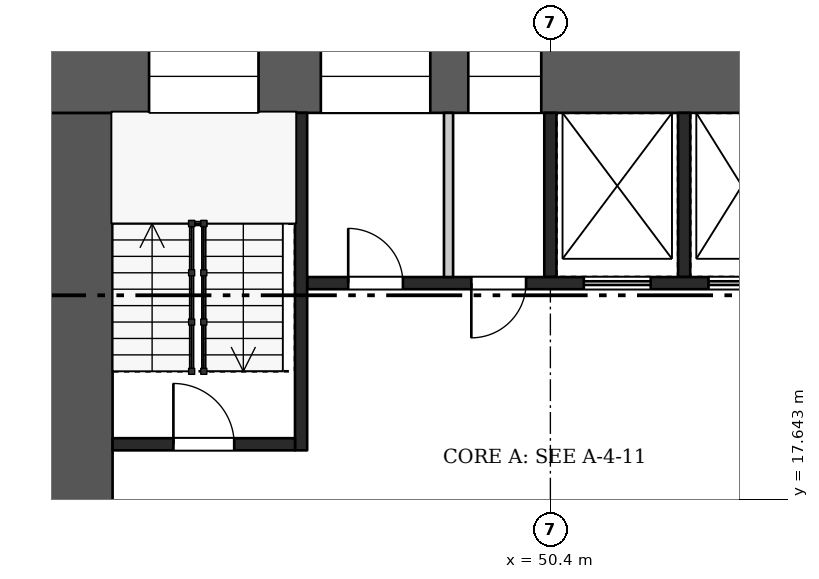
"""IFC4 building model, lengths in metres.
Left out: names, types, materials, properties, quantities, classifications, styles, units other than length and angle.
Written with IfcOpenShell. Run it as: python <this file> out.ifc"""

import sys

from ifc_helpers import new_model, si_unit, direction, frame, frame_2d, origin, place, context, subcontext, project, spatial, rectangle, extrude, element, fill, save


model = new_model("IFC4")
c1 = context("Model", 3, precision=1e-05, world=origin(), true_north=direction((0.0, 1.0)))
c2 = subcontext(c1, "Body", "Model", "MODEL_VIEW")
j1 = project(units=[si_unit("LENGTHUNIT", "METRE"), si_unit("PLANEANGLEUNIT", "RADIAN")], contexts=[c1])
p1 = place(None, origin())
s1 = spatial("IfcSite", under=j1, at=p1, CompositionType="ELEMENT")
p2 = place(p1, origin())
s2 = spatial("IfcBuilding", under=s1, at=p2, CompositionType="ELEMENT")
p3 = place(p2, frame((0.0, 0.0, 46.2)))
s3 = spatial("IfcBuildingStorey", under=s2, at=p3, CompositionType="ELEMENT", Elevation=46.2)
p4 = place(p3, frame((42.0, 24.6, 0.0), z_axis=(0.0, 0.0, 1.0), x_axis=(1.0, 0.0, 0.0)))
e1 = element("IfcWall", 1, at=p4, inside=s3, PredefinedType="SHEAR", context=c2, shape_type="SweptSolid", body=[
    extrude(rectangle(XDim=16.8, YDim=1.2, at=frame_2d((8.4, 0.0))), origin(), (0.0, 0.0, 1.0), 3.22),
])
p5 = place(p4, frame((1.8, 0.0, 0.5)))
e2 = element("IfcOpeningElement", 2, at=p5, cuts=e1, PredefinedType="OPENING", context=c2, shape_type="SweptSolid", body=[
    extrude(rectangle(XDim=1.8, YDim=2.4, at=frame_2d((0.9, 1.2))), frame((0.0, 0.61, 0.0), z_axis=(0.0, -1.0, 0.0), x_axis=(1.0, 0.0, 0.0)), (0.0, 0.0, 1.0), 1.22),
])
p6 = place(p4, frame((4.625, 0.0, 1.6)))
e3 = element("IfcOpeningElement", 3, at=p6, cuts=e1, PredefinedType="OPENING", context=c2, shape_type="SweptSolid", body=[
    extrude(rectangle(XDim=1.8, YDim=1.2, at=frame_2d((0.9, 0.6))), frame((0.0, 0.61, 0.0), z_axis=(0.0, -1.0, 0.0), x_axis=(1.0, 0.0, 0.0)), (0.0, 0.0, 1.0), 1.22),
])
p7 = place(p4, frame((7.05, 0.0, 1.6)))
e4 = element("IfcOpeningElement", 4, at=p7, cuts=e1, PredefinedType="OPENING", context=c2, shape_type="SweptSolid", body=[
    extrude(rectangle(XDim=1.2, YDim=1.2, at=frame_2d((0.6, 0.6))), frame((0.0, 0.61, 0.0), z_axis=(0.0, -1.0, 0.0), x_axis=(1.0, 0.0, 0.0)), (0.0, 0.0, 1.0), 1.22),
])
p8 = place(p4, frame((12.65, 0.0, 0.5)))
e5 = element("IfcOpeningElement", 5, at=p8, cuts=e1, PredefinedType="OPENING", context=c2, shape_type="SweptSolid", body=[
    extrude(rectangle(XDim=1.8, YDim=2.4, at=frame_2d((0.9, 1.2))), frame((0.0, 0.61, 0.0), z_axis=(0.0, -1.0, 0.0), x_axis=(1.0, 0.0, 0.0)), (0.0, 0.0, 1.0), 1.22),
])
p9 = place(p3, frame((42.6, 9.6, 0.0), z_axis=(0.0, 0.0, 1.0), x_axis=(0.0, 1.0, 0.0)))
e6 = element("IfcWall", 6, at=p9, inside=s3, PredefinedType="SHEAR", context=c2, shape_type="SweptSolid", body=[
    extrude(rectangle(XDim=14.4, YDim=1.2, at=frame_2d((7.2, 0.0))), origin(), (0.0, 0.0, 1.0), 3.22),
])
p10 = place(p9, frame((2.1, 0.0, 0.0)))
e7 = element("IfcOpeningElement", 7, at=p10, cuts=e6, PredefinedType="OPENING", context=c2, shape_type="SweptSolid", body=[
    extrude(rectangle(XDim=1.8, YDim=2.1, at=frame_2d((0.9, 1.05))), frame((0.0, 0.61, 0.0), z_axis=(0.0, -1.0, 0.0), x_axis=(1.0, 0.0, 0.0)), (0.0, 0.0, 1.0), 1.22),
])
for number, where, z_axis, x_axis in (
    (8, (50.4, 21.3, 0.0), (0.0, 0.0, 1.0), (0.0, 1.0, 0.0)),
    (9, (52.6, 21.3, 0.0), (0.0, 0.0, 1.0), (0.0, 1.0, 0.0)),
):
    element("IfcWall", number, at=place(p3, frame(where, z_axis=z_axis, x_axis=x_axis)), inside=s3, PredefinedType="SHEAR", context=c2, shape_type="SweptSolid", body=[
        extrude(rectangle(XDim=2.7, YDim=0.2, at=frame_2d((1.35, 0.0))), origin(), (0.0, 0.0, 1.0), 3.22),
    ])
p11 = place(p3, frame((48.725, 21.3, 0.0), z_axis=(0.0, 0.0, 1.0), x_axis=(0.0, 1.0, 0.0)))
e10 = element("IfcWall", 10, at=p11, inside=s3, PredefinedType="PARTITIONING", context=c2, shape_type="SweptSolid", body=[
    extrude(rectangle(XDim=2.7, YDim=0.15, at=frame_2d((1.35, 0.0))), origin(), (0.0, 0.0, 1.0), 3.22),
])
p12 = place(p3, frame((46.4, 21.2, 0.0), z_axis=(0.0, 0.0, 1.0), x_axis=(1.0, 0.0, 0.0)))
e11 = element("IfcWall", 11, at=p12, inside=s3, PredefinedType="SHEAR", context=c2, shape_type="SweptSolid", body=[
    extrude(rectangle(XDim=8.0, YDim=0.2, at=frame_2d((4.0, 0.0))), origin(), (0.0, 0.0, 1.0), 3.22),
])
p13 = place(p12, frame((0.675, 0.0, 0.0)))
e12 = element("IfcOpeningElement", 12, at=p13, cuts=e11, PredefinedType="OPENING", context=c2, shape_type="SweptSolid", body=[
    extrude(rectangle(XDim=0.9, YDim=2.1, at=frame_2d((0.45, 1.05))), frame((0.0, 0.11, 0.0), z_axis=(0.0, -1.0, 0.0), x_axis=(1.0, 0.0, 0.0)), (0.0, 0.0, 1.0), 0.22),
])
p14 = place(p12, frame((2.7, 0.0, 0.0)))
e13 = element("IfcOpeningElement", 13, at=p14, cuts=e11, PredefinedType="OPENING", context=c2, shape_type="SweptSolid", body=[
    extrude(rectangle(XDim=0.9, YDim=2.1, at=frame_2d((0.45, 1.05))), frame((0.0, 0.11, 0.0), z_axis=(0.0, -1.0, 0.0), x_axis=(1.0, 0.0, 0.0)), (0.0, 0.0, 1.0), 0.22),
])
p15 = place(p12, frame((4.55, 0.0, 0.0)))
e14 = element("IfcOpeningElement", 14, at=p15, cuts=e11, PredefinedType="OPENING", context=c2, shape_type="SweptSolid", body=[
    extrude(rectangle(XDim=1.1, YDim=2.1, at=frame_2d((0.55, 1.05))), frame((0.0, 0.11, 0.0), z_axis=(0.0, -1.0, 0.0), x_axis=(1.0, 0.0, 0.0)), (0.0, 0.0, 1.0), 0.22),
])
p16 = place(p12, frame((6.6, 0.0, 0.0)))
e15 = element("IfcOpeningElement", 15, at=p16, cuts=e11, PredefinedType="OPENING", context=c2, shape_type="SweptSolid", body=[
    extrude(rectangle(XDim=1.1, YDim=2.1, at=frame_2d((0.55, 1.05))), frame((0.0, 0.11, 0.0), z_axis=(0.0, -1.0, 0.0), x_axis=(1.0, 0.0, 0.0)), (0.0, 0.0, 1.0), 0.22),
])
p17 = place(p3, frame((46.3, 18.45, 0.0), z_axis=(0.0, 0.0, 1.0), x_axis=(0.0, 1.0, 0.0)))
e16 = element("IfcWall", 16, at=p17, inside=s3, PredefinedType="SHEAR", context=c2, shape_type="SweptSolid", body=[
    extrude(rectangle(XDim=5.55, YDim=0.2, at=frame_2d((2.775, 0.0))), origin(), (0.0, 0.0, 1.0), 3.22),
])
p18 = place(p3, frame((43.2, 18.55, 0.0), z_axis=(0.0, 0.0, 1.0), x_axis=(1.0, 0.0, 0.0)))
e17 = element("IfcWall", 17, at=p18, inside=s3, PredefinedType="SHEAR", context=c2, shape_type="SweptSolid", body=[
    extrude(rectangle(XDim=3.0, YDim=0.2, at=frame_2d((1.5, 0.0))), origin(), (0.0, 0.0, 1.0), 3.22),
])
p19 = place(p18, frame((1.0, 0.0, 0.0)))
e18 = element("IfcOpeningElement", 18, at=p19, cuts=e17, PredefinedType="OPENING", context=c2, shape_type="SweptSolid", body=[
    extrude(rectangle(XDim=1.0, YDim=2.1, at=frame_2d((0.5, 1.05))), frame((0.0, 0.11, 0.0), z_axis=(0.0, -1.0, 0.0), x_axis=(1.0, 0.0, 0.0)), (0.0, 0.0, 1.0), 0.22),
])
p20 = place(p13, origin())
e19 = element("IfcDoor", 19, at=p20, inside=s3, OperationType="SINGLE_SWING_LEFT", PredefinedType="DOOR", context=c2, shape_type="SweptSolid", body=[
    extrude(rectangle(XDim=0.9, YDim=2.1, at=frame_2d((0.45, 1.05))), frame((0.0, 0.025, 0.0), z_axis=(0.0, -1.0, 0.0), x_axis=(1.0, 0.0, 0.0)), (0.0, 0.0, 1.0), 0.05),
])
fill(e12, e19)
p21 = place(p14, frame((0.9, 0.0, 0.0), z_axis=(0.0, 0.0, 1.0), x_axis=(-1.0, 0.0, 0.0)))
e20 = element("IfcDoor", 20, at=p21, inside=s3, OperationType="SINGLE_SWING_RIGHT", PredefinedType="DOOR", context=c2, shape_type="SweptSolid", body=[
    extrude(rectangle(XDim=0.9, YDim=2.1, at=frame_2d((0.45, 1.05))), frame((0.0, 0.025, 0.0), z_axis=(0.0, -1.0, 0.0), x_axis=(1.0, 0.0, 0.0)), (0.0, 0.0, 1.0), 0.05),
])
fill(e13, e20)
p22 = place(p15, origin())
e21 = element("IfcDoor", 21, at=p22, inside=s3, OperationType="DOUBLE_DOOR_SLIDING", PredefinedType="DOOR", context=c2, shape_type="SweptSolid", body=[
    extrude(rectangle(XDim=1.1, YDim=2.1, at=frame_2d((0.55, 1.05))), frame((0.0, 0.025, 0.0), z_axis=(0.0, -1.0, 0.0), x_axis=(1.0, 0.0, 0.0)), (0.0, 0.0, 1.0), 0.05),
])
fill(e14, e21)
p23 = place(p16, origin())
e22 = element("IfcDoor", 22, at=p23, inside=s3, OperationType="DOUBLE_DOOR_SLIDING", PredefinedType="DOOR", context=c2, shape_type="SweptSolid", body=[
    extrude(rectangle(XDim=1.1, YDim=2.1, at=frame_2d((0.55, 1.05))), frame((0.0, 0.025, 0.0), z_axis=(0.0, -1.0, 0.0), x_axis=(1.0, 0.0, 0.0)), (0.0, 0.0, 1.0), 0.05),
])
fill(e15, e22)
p24 = place(p19, origin())
e23 = element("IfcDoor", 23, at=p24, inside=s3, OperationType="SINGLE_SWING_LEFT", PredefinedType="DOOR", context=c2, shape_type="SweptSolid", body=[
    extrude(rectangle(XDim=1.0, YDim=2.1, at=frame_2d((0.5, 1.05))), frame((0.0, 0.025, 0.0), z_axis=(0.0, -1.0, 0.0), x_axis=(1.0, 0.0, 0.0)), (0.0, 0.0, 1.0), 0.05),
])
fill(e18, e23)
p25 = place(p5, origin())
e24 = element("IfcWindow", 24, at=p25, inside=s3, PartitioningType="SINGLE_PANEL", PredefinedType="WINDOW", context=c2, shape_type="SweptSolid", body=[
    extrude(rectangle(XDim=1.8, YDim=2.4, at=frame_2d((0.9, 1.2))), frame((0.0, 0.03, 0.0), z_axis=(0.0, -1.0, 0.0), x_axis=(1.0, 0.0, 0.0)), (0.0, 0.0, 1.0), 0.06),
])
fill(e2, e24)
p26 = place(p6, origin())
e25 = element("IfcWindow", 25, at=p26, inside=s3, PartitioningType="SINGLE_PANEL", PredefinedType="WINDOW", context=c2, shape_type="SweptSolid", body=[
    extrude(rectangle(XDim=1.8, YDim=1.2, at=frame_2d((0.9, 0.6))), frame((0.0, 0.03, 0.0), z_axis=(0.0, -1.0, 0.0), x_axis=(1.0, 0.0, 0.0)), (0.0, 0.0, 1.0), 0.06),
])
fill(e3, e25)
p27 = place(p7, origin())
e26 = element("IfcWindow", 26, at=p27, inside=s3, PartitioningType="SINGLE_PANEL", PredefinedType="WINDOW", context=c2, shape_type="SweptSolid", body=[
    extrude(rectangle(XDim=1.2, YDim=1.2, at=frame_2d((0.6, 0.6))), frame((0.0, 0.03, 0.0), z_axis=(0.0, -1.0, 0.0), x_axis=(1.0, 0.0, 0.0)), (0.0, 0.0, 1.0), 0.06),
])
fill(e4, e26)
save(model, sys.argv[1])
